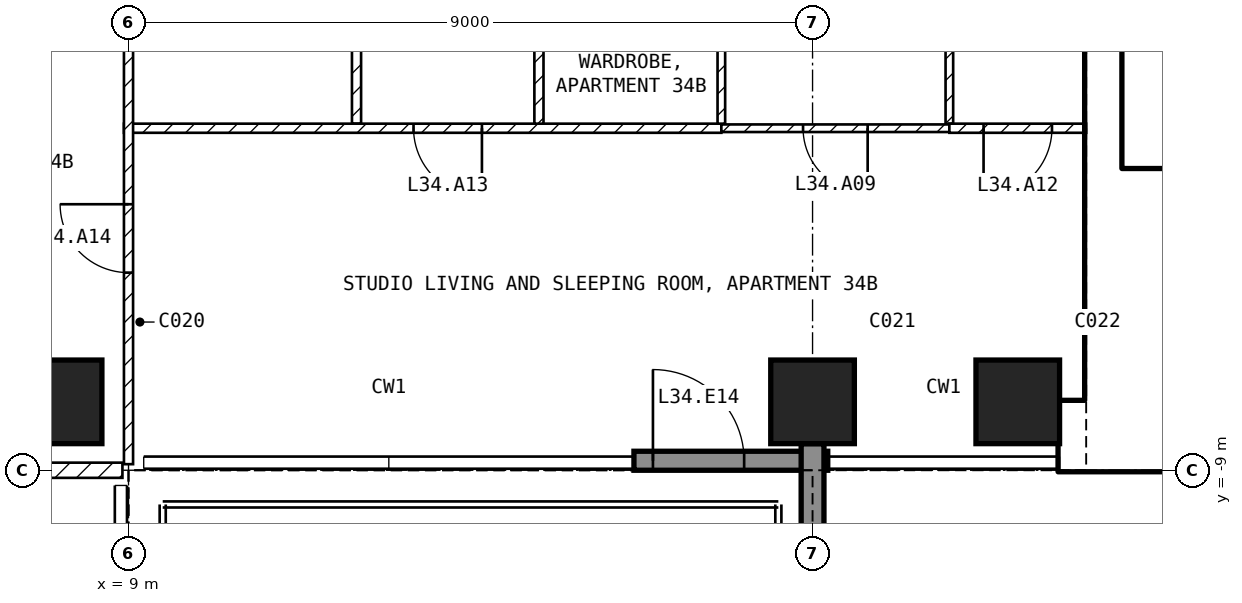
"""IFC4 building model, lengths in metres.
Left out: names, types, materials, properties, quantities, classifications, styles, units other than length and angle.
Written with IfcOpenShell. Run it as: python <this file> out.ifc"""

import sys

from ifc_helpers import new_model, si_unit, direction, frame, frame_2d, origin, origin_2d, place, context, subcontext, project, spatial, rectangle, extrude, element, fill, save


model = new_model("IFC4")
c1 = context("Model", 3, precision=1e-05, world=origin(), true_north=direction((0.0, 1.0)))
c2 = subcontext(c1, "Body", "Model", "MODEL_VIEW")
j1 = project(units=[si_unit("LENGTHUNIT", "METRE"), si_unit("PLANEANGLEUNIT", "RADIAN")], contexts=[c1])
p1 = place(None, origin())
s1 = spatial("IfcSite", under=j1, at=p1, CompositionType="ELEMENT")
p2 = place(p1, origin())
s2 = spatial("IfcBuilding", under=s1, at=p2, CompositionType="ELEMENT")
p3 = place(p2, frame((0.0, 0.0, 140.9)))
s3 = spatial("IfcBuildingStorey", under=s2, at=p3, CompositionType="ELEMENT", Elevation=140.9)
for number, where, z_axis, x_axis in (
    (1, (8.1, -8.1, -0.25), (0.0, 0.0, 1.0), (1.0, 0.0, 0.0)),
    (2, (18.0, -8.1, -0.25), (0.0, 0.0, 1.0), (1.0, 0.0, 0.0)),
    (3, (20.7, -8.1, -0.25), (0.0, 0.0, 1.0), (1.0, 0.0, 0.0)),
):
    element("IfcColumn", number, at=place(p3, frame(where, z_axis=z_axis, x_axis=x_axis)), inside=s3, PredefinedType="COLUMN", context=c2, shape_type="SweptSolid", body=[
        extrude(rectangle(XDim=1.1, YDim=1.1, at=origin_2d()), origin(), (0.0, 0.0, 1.0), 3.5),
    ])
p4 = place(p3, frame((15.65, -8.875, 0.0), z_axis=(0.0, 0.0, 1.0), x_axis=(1.0, 0.0, 0.0)))
e4 = element("IfcWall", 4, at=p4, inside=s3, PredefinedType="SOLIDWALL", context=c2, shape_type="SweptSolid", body=[
    extrude(rectangle(XDim=2.55, YDim=0.25, at=frame_2d((1.275, 0.0))), origin(), (0.0, 0.0, 1.0), 3.25),
])
p5 = place(p4, frame((0.25, 0.0, 0.0)))
e5 = element("IfcOpeningElement", 5, at=p5, cuts=e4, PredefinedType="OPENING", context=c2, shape_type="SweptSolid", body=[
    extrude(rectangle(XDim=1.2, YDim=2.4, at=frame_2d((0.6, 1.2))), frame((0.0, 0.135, 0.0), z_axis=(0.0, -1.0, 0.0), x_axis=(1.0, 0.0, 0.0)), (0.0, 0.0, 1.0), 0.27),
])
p6 = place(p3, frame((18.0, -8.65, 0.0), z_axis=(0.0, 0.0, 1.0), x_axis=(0.0, -1.0, 0.0)))
e6 = element("IfcWall", 6, at=p6, inside=s3, PredefinedType="SOLIDWALL", context=c2, shape_type="SweptSolid", body=[
    extrude(rectangle(XDim=3.09, YDim=0.3, at=frame_2d((1.545, 0.0))), origin(), (0.0, 0.0, 1.0), 3.25),
])
p7 = place(p3, frame((21.25, -8.55, 0.0), z_axis=(0.0, 0.0, 1.0), x_axis=(1.0, 0.0, 0.0)))
e7 = element("IfcWall", 7, at=p7, inside=s3, PredefinedType="SHEAR", context=c2, shape_type="SweptSolid", body=[
    extrude(rectangle(XDim=8.95, YDim=0.9, at=frame_2d((4.475, 0.0))), origin(), (0.0, 0.0, 1.0), 3.25),
])
p8 = place(p3, frame((21.825, -8.1, 0.0), z_axis=(0.0, 0.0, 1.0), x_axis=(0.0, 1.0, 0.0)))
e8 = element("IfcWall", 8, at=p8, inside=s3, PredefinedType="SHEAR", context=c2, shape_type="SweptSolid", body=[
    extrude(rectangle(XDim=6.9, YDim=0.45, at=frame_2d((3.45, 0.0))), origin(), (0.0, 0.0, 1.0), 3.25),
])
p9 = place(p3, frame((22.05, -5.15, 0.0), z_axis=(0.0, 0.0, 1.0), x_axis=(1.0, 0.0, 0.0)))
e9 = element("IfcWall", 9, at=p9, inside=s3, PredefinedType="SOLIDWALL", context=c2, shape_type="SweptSolid", body=[
    extrude(rectangle(XDim=6.3, YDim=0.2, at=frame_2d((3.15, 0.0))), origin(), (0.0, 0.0, 1.0), 3.25),
])
p10 = place(p9, frame((0.2, 0.0, 0.0)))
e10 = element("IfcOpeningElement", 10, at=p10, cuts=e9, PredefinedType="OPENING", context=c2, shape_type="SweptSolid", body=[
    extrude(rectangle(XDim=1.0, YDim=2.1, at=frame_2d((0.5, 1.05))), frame((0.0, 0.11, 0.0), z_axis=(0.0, -1.0, 0.0), x_axis=(1.0, 0.0, 0.0)), (0.0, 0.0, 1.0), 0.22),
])
p11 = place(p3, frame((8.92, -9.0, 0.0), z_axis=(0.0, 0.0, 1.0), x_axis=(-1.0, 0.0, 0.0)))
e11 = element("IfcWall", 11, at=p11, inside=s3, PredefinedType="PARTITIONING", context=c2, shape_type="SweptSolid", body=[
    extrude(rectangle(XDim=17.84, YDim=0.2, at=frame_2d((8.92, 0.0))), origin(), (0.0, 0.0, 1.0), 3.25),
])
p12 = place(p11, frame((8.42, 0.0, 0.0)))
e12 = element("IfcOpeningElement", 12, at=p12, cuts=e11, PredefinedType="OPENING", context=c2, shape_type="SweptSolid", body=[
    extrude(rectangle(XDim=1.0, YDim=2.1, at=frame_2d((0.5, 1.05))), frame((0.0, 0.11, 0.0), z_axis=(0.0, -1.0, 0.0), x_axis=(1.0, 0.0, 0.0)), (0.0, 0.0, 1.0), 0.22),
])
p13 = place(p3, frame((12.0, -1.3, 0.0), z_axis=(0.0, 0.0, 1.0), x_axis=(0.0, -1.0, 0.0)))
e13 = element("IfcWall", 13, at=p13, inside=s3, PredefinedType="PARTITIONING", context=c2, shape_type="SweptSolid", body=[
    extrude(rectangle(XDim=3.14, YDim=0.12, at=frame_2d((1.57, 0.0))), origin(), (0.0, 0.0, 1.0), 3.25),
])
p14 = place(p13, frame((1.12, 0.0, 0.0)))
e14 = element("IfcOpeningElement", 14, at=p14, cuts=e13, PredefinedType="OPENING", context=c2, shape_type="SweptSolid", body=[
    extrude(rectangle(XDim=0.9, YDim=2.1, at=frame_2d((0.45, 1.05))), frame((0.0, 0.07, 0.0), z_axis=(0.0, -1.0, 0.0), x_axis=(1.0, 0.0, 0.0)), (0.0, 0.0, 1.0), 0.14),
])
p15 = place(p3, frame((16.8, -4.5, 0.0), z_axis=(0.0, 0.0, 1.0), x_axis=(-1.0, 0.0, 0.0)))
e15 = element("IfcWall", 15, at=p15, inside=s3, PredefinedType="PARTITIONING", context=c2, shape_type="SweptSolid", body=[
    extrude(rectangle(XDim=7.86, YDim=0.12, at=frame_2d((3.93, 0.0))), origin(), (0.0, 0.0, 1.0), 3.25),
])
p16 = place(p15, frame((3.15, 0.0, 0.0)))
e16 = element("IfcOpeningElement", 16, at=p16, cuts=e15, PredefinedType="OPENING", context=c2, shape_type="SweptSolid", body=[
    extrude(rectangle(XDim=0.9, YDim=2.1, at=frame_2d((0.45, 1.05))), frame((0.0, 0.07, 0.0), z_axis=(0.0, -1.0, 0.0), x_axis=(1.0, 0.0, 0.0)), (0.0, 0.0, 1.0), 0.14),
])
p17 = place(p3, frame((9.0, -8.92, 0.0), z_axis=(0.0, 0.0, 1.0), x_axis=(0.0, 1.0, 0.0)))
e17 = element("IfcWall", 17, at=p17, inside=s3, PredefinedType="PARTITIONING", context=c2, shape_type="SweptSolid", body=[
    extrude(rectangle(XDim=7.62, YDim=0.12, at=frame_2d((3.81, 0.0))), origin(), (0.0, 0.0, 1.0), 3.25),
])
p18 = place(p17, frame((2.52, 0.0, 0.0)))
e18 = element("IfcOpeningElement", 18, at=p18, cuts=e17, PredefinedType="OPENING", context=c2, shape_type="SweptSolid", body=[
    extrude(rectangle(XDim=0.9, YDim=2.1, at=frame_2d((0.45, 1.05))), frame((0.0, 0.07, 0.0), z_axis=(0.0, -1.0, 0.0), x_axis=(1.0, 0.0, 0.0)), (0.0, 0.0, 1.0), 0.14),
])
p19 = place(p3, frame((14.4, -1.3, 0.0), z_axis=(0.0, 0.0, 1.0), x_axis=(0.0, -1.0, 0.0)))
e19 = element("IfcWall", 19, at=p19, inside=s3, PredefinedType="PARTITIONING", context=c2, shape_type="SweptSolid", body=[
    extrude(rectangle(XDim=3.14, YDim=0.12, at=frame_2d((1.57, 0.0))), origin(), (0.0, 0.0, 1.0), 3.25),
])
p20 = place(p19, frame((1.12, 0.0, 0.0)))
e20 = element("IfcOpeningElement", 20, at=p20, cuts=e19, PredefinedType="OPENING", context=c2, shape_type="SweptSolid", body=[
    extrude(rectangle(XDim=0.9, YDim=2.1, at=frame_2d((0.45, 1.05))), frame((0.0, 0.07, 0.0), z_axis=(0.0, -1.0, 0.0), x_axis=(1.0, 0.0, 0.0)), (0.0, 0.0, 1.0), 0.14),
])
for number, where, z_axis, x_axis in (
    (21, (16.8, -1.3, 0.0), (0.0, 0.0, 1.0), (0.0, -1.0, 0.0)),
    (22, (19.8, -1.3, 0.0), (0.0, 0.0, 1.0), (0.0, -1.0, 0.0)),
):
    element("IfcWall", number, at=place(p3, frame(where, z_axis=z_axis, x_axis=x_axis)), inside=s3, PredefinedType="PARTITIONING", context=c2, shape_type="SweptSolid", body=[
        extrude(rectangle(XDim=3.14, YDim=0.1, at=frame_2d((1.57, 0.0))), origin(), (0.0, 0.0, 1.0), 3.25),
    ])
p21 = place(p3, frame((19.8, -4.5, 0.0), z_axis=(0.0, 0.0, 1.0), x_axis=(-1.0, 0.0, 0.0)))
e23 = element("IfcWall", 23, at=p21, inside=s3, PredefinedType="PARTITIONING", context=c2, shape_type="SweptSolid", body=[
    extrude(rectangle(XDim=3.0, YDim=0.1, at=frame_2d((1.5, 0.0))), origin(), (0.0, 0.0, 1.0), 3.25),
])
p22 = place(p21, frame((1.075, 0.0, 0.0)))
e24 = element("IfcOpeningElement", 24, at=p22, cuts=e23, PredefinedType="OPENING", context=c2, shape_type="SweptSolid", body=[
    extrude(rectangle(XDim=0.85, YDim=2.1, at=frame_2d((0.425, 1.05))), frame((0.0, 0.06, 0.0), z_axis=(0.0, -1.0, 0.0), x_axis=(1.0, 0.0, 0.0)), (0.0, 0.0, 1.0), 0.12),
])
p23 = place(p3, frame((21.6, -4.5, 0.0), z_axis=(0.0, 0.0, 1.0), x_axis=(-1.0, 0.0, 0.0)))
e25 = element("IfcWall", 25, at=p23, inside=s3, PredefinedType="PARTITIONING", context=c2, shape_type="SweptSolid", body=[
    extrude(rectangle(XDim=1.8, YDim=0.12, at=frame_2d((0.9, 0.0))), origin(), (0.0, 0.0, 1.0), 3.25),
])
p24 = place(p23, frame((0.45, 0.0, 0.0)))
e26 = element("IfcOpeningElement", 26, at=p24, cuts=e25, PredefinedType="OPENING", context=c2, shape_type="SweptSolid", body=[
    extrude(rectangle(XDim=0.9, YDim=2.1, at=frame_2d((0.45, 1.05))), frame((0.0, 0.07, 0.0), z_axis=(0.0, -1.0, 0.0), x_axis=(1.0, 0.0, 0.0)), (0.0, 0.0, 1.0), 0.14),
])
p25 = place(p5, origin())
e27 = element("IfcDoor", 27, at=p25, inside=s3, OperationType="SINGLE_SWING_LEFT", PredefinedType="DOOR", context=c2, shape_type="SweptSolid", body=[
    extrude(rectangle(XDim=1.2, YDim=2.4, at=frame_2d((0.6, 1.2))), frame((0.0, 0.025, 0.0), z_axis=(0.0, -1.0, 0.0), x_axis=(1.0, 0.0, 0.0)), (0.0, 0.0, 1.0), 0.05),
])
fill(e5, e27)
p26 = place(p10, origin())
e28 = element("IfcDoor", 28, at=p26, inside=s3, OperationType="SINGLE_SWING_LEFT", PredefinedType="DOOR", context=c2, shape_type="SweptSolid", body=[
    extrude(rectangle(XDim=1.0, YDim=2.1, at=frame_2d((0.5, 1.05))), frame((0.0, 0.025, 0.0), z_axis=(0.0, -1.0, 0.0), x_axis=(1.0, 0.0, 0.0)), (0.0, 0.0, 1.0), 0.05),
])
fill(e10, e28)
p27 = place(p22, origin())
e29 = element("IfcDoor", 29, at=p27, inside=s3, OperationType="SINGLE_SWING_LEFT", PredefinedType="DOOR", context=c2, shape_type="SweptSolid", body=[
    extrude(rectangle(XDim=0.85, YDim=2.1, at=frame_2d((0.425, 1.05))), frame((0.0, 0.025, 0.0), z_axis=(0.0, -1.0, 0.0), x_axis=(1.0, 0.0, 0.0)), (0.0, 0.0, 1.0), 0.05),
])
fill(e24, e29)
p28 = place(p24, origin())
e30 = element("IfcDoor", 30, at=p28, inside=s3, OperationType="SINGLE_SWING_RIGHT", PredefinedType="DOOR", context=c2, shape_type="SweptSolid", body=[
    extrude(rectangle(XDim=0.9, YDim=2.1, at=frame_2d((0.45, 1.05))), frame((0.0, 0.025, 0.0), z_axis=(0.0, -1.0, 0.0), x_axis=(1.0, 0.0, 0.0)), (0.0, 0.0, 1.0), 0.05),
])
fill(e26, e30)
p29 = place(p16, origin())
e31 = element("IfcDoor", 31, at=p29, inside=s3, OperationType="SINGLE_SWING_LEFT", PredefinedType="DOOR", context=c2, shape_type="SweptSolid", body=[
    extrude(rectangle(XDim=0.9, YDim=2.1, at=frame_2d((0.45, 1.05))), frame((0.0, 0.025, 0.0), z_axis=(0.0, -1.0, 0.0), x_axis=(1.0, 0.0, 0.0)), (0.0, 0.0, 1.0), 0.05),
])
fill(e16, e31)
p30 = place(p18, origin())
e32 = element("IfcDoor", 32, at=p30, inside=s3, OperationType="SINGLE_SWING_RIGHT", PredefinedType="DOOR", context=c2, shape_type="SweptSolid", body=[
    extrude(rectangle(XDim=0.9, YDim=2.1, at=frame_2d((0.45, 1.05))), frame((0.0, 0.025, 0.0), z_axis=(0.0, -1.0, 0.0), x_axis=(1.0, 0.0, 0.0)), (0.0, 0.0, 1.0), 0.05),
])
fill(e18, e32)
save(model, sys.argv[1])
